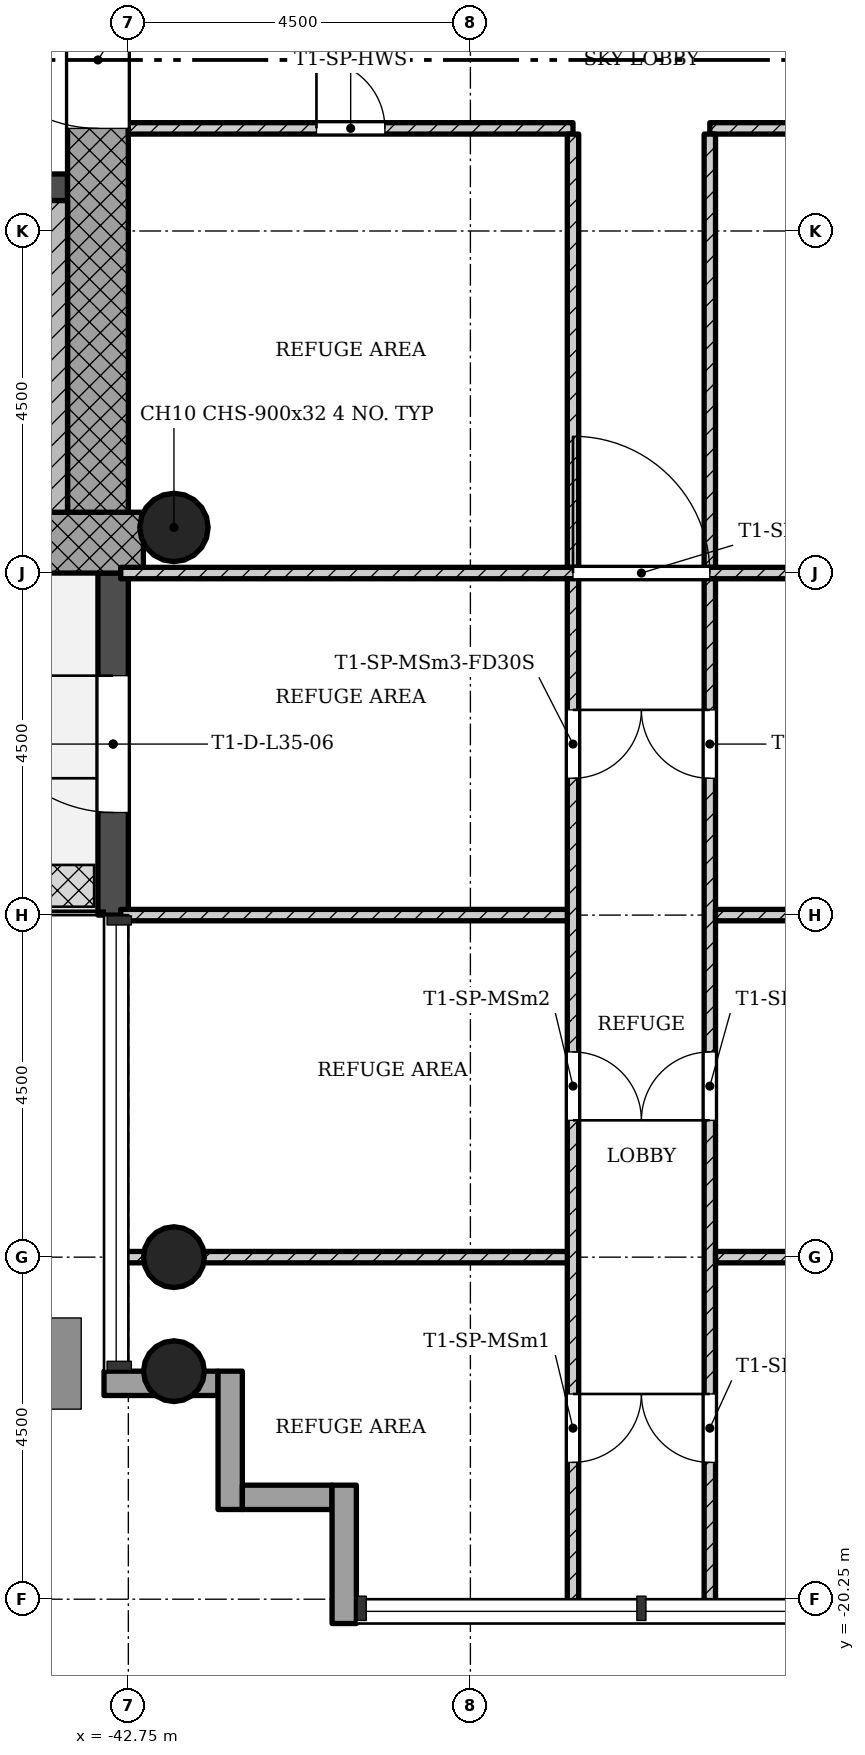
"""IFC4 building model, lengths in metres.
Left out: names, types, materials, properties, quantities, classifications, styles, units other than length and angle.
Written with IfcOpenShell. Run it as: python <this file> out.ifc"""

import sys

from ifc_helpers import new_model, si_unit, direction, frame, frame_2d, origin, origin_2d, place, context, subcontext, project, spatial, rectangle, hollow_circle, extrude, element, fill, save


model = new_model("IFC4")
c1 = context("Model", 3, precision=1e-05, world=origin(), true_north=direction((0.0, 1.0)))
c2 = subcontext(c1, "Body", "Model", "MODEL_VIEW")
j1 = project(units=[si_unit("LENGTHUNIT", "METRE"), si_unit("PLANEANGLEUNIT", "RADIAN")], contexts=[c1])
p1 = place(None, origin())
s1 = spatial("IfcSite", under=j1, at=p1, CompositionType="ELEMENT")
p2 = place(p1, origin())
s2 = spatial("IfcBuilding", under=s1, at=p2, CompositionType="ELEMENT")
p3 = place(p2, frame((0.0, 0.0, 128.7)))
s3 = spatial("IfcBuildingStorey", under=s2, at=p3, CompositionType="ELEMENT", Elevation=128.7)
p4 = place(p3, frame((-51.348, -6.35, 0.0), z_axis=(0.0, 0.0, 1.0), x_axis=(1.0, 0.0, 0.0)))
e1 = element("IfcWall", 1, at=p4, inside=s3, PredefinedType="SHEAR", context=c2, shape_type="SweptSolid", body=[
    extrude(rectangle(XDim=8.796, YDim=0.8, at=frame_2d((4.398, 0.0))), origin(), (0.0, 0.0, 1.0), 5.0),
])
p5 = place(p3, frame((-43.15, -5.95, 0.0), z_axis=(0.0, 0.0, 1.0), x_axis=(0.0, 1.0, 0.0)))
e2 = element("IfcWall", 2, at=p5, inside=s3, PredefinedType="SHEAR", context=c2, shape_type="SweptSolid", body=[
    extrude(rectangle(XDim=12.7, YDim=0.8, at=frame_2d((6.35, 0.0))), origin(), (0.0, 0.0, 1.0), 5.0),
])
p6 = place(p5, frame((5.05, 0.0, 0.0)))
e3 = element("IfcOpeningElement", 3, at=p6, cuts=e2, PredefinedType="OPENING", context=c2, shape_type="SweptSolid", body=[
    extrude(rectangle(XDim=1.8, YDim=2.1, at=frame_2d((0.9, 1.05))), frame((0.0, 0.41, 0.0), z_axis=(0.0, -1.0, 0.0), x_axis=(1.0, 0.0, 0.0)), (0.0, 0.0, 1.0), 0.82),
])
p7 = place(p3, frame((-50.95, -1.675, 0.0), z_axis=(0.0, 0.0, 1.0), x_axis=(1.0, 0.0, 0.0)))
e4 = element("IfcWall", 4, at=p7, inside=s3, PredefinedType="SHEAR", context=c2, shape_type="SweptSolid", body=[
    extrude(rectangle(XDim=7.4, YDim=0.35, at=frame_2d((3.7, 0.0))), origin(), (0.0, 0.0, 1.0), 5.0),
])
p8 = place(p7, frame((5.65, 0.0, 0.0)))
e5 = element("IfcOpeningElement", 5, at=p8, cuts=e4, PredefinedType="OPENING", context=c2, shape_type="SweptSolid", body=[
    extrude(rectangle(XDim=0.9, YDim=2.1, at=frame_2d((0.45, 1.05))), frame((0.0, 0.185, 0.0), z_axis=(0.0, -1.0, 0.0), x_axis=(1.0, 0.0, 0.0)), (0.0, 0.0, 1.0), 0.37),
])
for number, where, z_axis, x_axis in (
    (6, (-42.15, -15.75, 0.0), (0.0, 0.0, 1.0), (1.0, 0.0, 0.0)),
    (7, (-42.15, -17.25, 0.0), (0.0, 0.0, 1.0), (1.0, 0.0, 0.0)),
):
    element("IfcColumn", number, at=place(p3, frame(where, z_axis=z_axis, x_axis=x_axis)), inside=s3, PredefinedType="COLUMN", context=c2, shape_type="SweptSolid", body=[
        extrude(hollow_circle(Radius=0.4, WallThickness=0.028, at=origin_2d()), origin(), (0.0, 0.0, 1.0), 5.0),
    ])
p9 = place(p3, frame((-42.15, -6.15, 0.0), z_axis=(0.0, 0.0, 1.0), x_axis=(1.0, 0.0, 0.0)))
e8 = element("IfcColumn", 8, at=p9, inside=s3, PredefinedType="COLUMN", context=c2, shape_type="SweptSolid", body=[
    extrude(hollow_circle(Radius=0.45, WallThickness=0.032, at=origin_2d()), origin(), (0.0, 0.0, 1.0), 5.0),
])
p10 = place(p3, frame((-42.95, -6.75, -0.02), z_axis=(0.0, 0.0, 1.0), x_axis=(0.0, -1.0, 0.0)))
e9 = element("IfcWall", 9, at=p10, inside=s3, PredefinedType="STANDARD", context=c2, shape_type="SweptSolid", body=[
    extrude(rectangle(XDim=4.5, YDim=0.4, at=frame_2d((2.25, 0.0))), origin(), (0.0, 0.0, 1.0), 4.72),
])
p11 = place(p10, frame((1.35, 0.0, 0.02)))
e10 = element("IfcOpeningElement", 10, at=p11, cuts=e9, PredefinedType="OPENING", context=c2, shape_type="SweptSolid", body=[
    extrude(rectangle(XDim=1.8, YDim=2.1, at=frame_2d((0.9, 1.05))), frame((0.0, 0.21, 0.0), z_axis=(0.0, -1.0, 0.0), x_axis=(1.0, 0.0, 0.0)), (0.0, 0.0, 1.0), 0.42),
])
p12 = place(p3, frame((-43.07, -17.41, -0.3), z_axis=(0.0, 0.0, 1.0), x_axis=(1.0, 0.0, 0.0)))
e11 = element("IfcWall", 11, at=p12, inside=s3, PredefinedType="STANDARD", context=c2, shape_type="SweptSolid", body=[
    extrude(rectangle(XDim=1.5, YDim=0.32, at=frame_2d((0.75, 0.0))), origin(), (0.0, 0.0, 1.0), 5.0),
])
p13 = place(p3, frame((-41.41, -17.25, -0.3), z_axis=(0.0, 0.0, 1.0), x_axis=(0.0, -1.0, 0.0)))
e12 = element("IfcWall", 12, at=p13, inside=s3, PredefinedType="STANDARD", context=c2, shape_type="SweptSolid", body=[
    extrude(rectangle(XDim=1.82, YDim=0.32, at=frame_2d((0.91, 0.0))), origin(), (0.0, 0.0, 1.0), 5.0),
])
p14 = place(p3, frame((-41.25, -18.91, -0.3), z_axis=(0.0, 0.0, 1.0), x_axis=(1.0, 0.0, 0.0)))
e13 = element("IfcWall", 13, at=p14, inside=s3, PredefinedType="STANDARD", context=c2, shape_type="SweptSolid", body=[
    extrude(rectangle(XDim=1.18, YDim=0.32, at=frame_2d((0.59, 0.0))), origin(), (0.0, 0.0, 1.0), 5.0),
])
p15 = place(p3, frame((-39.91, -18.75, -0.3), z_axis=(0.0, 0.0, 1.0), x_axis=(0.0, -1.0, 0.0)))
e14 = element("IfcWall", 14, at=p15, inside=s3, PredefinedType="STANDARD", context=c2, shape_type="SweptSolid", body=[
    extrude(rectangle(XDim=1.82, YDim=0.32, at=frame_2d((0.91, 0.0))), origin(), (0.0, 0.0, 1.0), 5.0),
])
p16 = place(p3, frame((-35.1, -0.9, 0.0), z_axis=(0.0, 0.0, 1.0), x_axis=(1.0, 0.0, 0.0)))
e15 = element("IfcWall", 15, at=p16, inside=s3, PredefinedType="PARTITIONING", context=c2, shape_type="SweptSolid", body=[
    extrude(rectangle(XDim=5.85, YDim=0.15, at=frame_2d((2.925, 0.0))), origin(), (0.0, 0.0, 1.0), 4.58),
])
p17 = place(p16, frame((2.475, 0.0, 0.0)))
e16 = element("IfcOpeningElement", 16, at=p17, cuts=e15, PredefinedType="OPENING", context=c2, shape_type="SweptSolid", body=[
    extrude(rectangle(XDim=0.9, YDim=2.1, at=frame_2d((0.45, 1.05))), frame((0.0, 0.085, 0.0), z_axis=(0.0, -1.0, 0.0), x_axis=(1.0, 0.0, 0.0)), (0.0, 0.0, 1.0), 0.17),
])
p18 = place(p3, frame((-35.1, -6.675, 0.0), z_axis=(0.0, 0.0, 1.0), x_axis=(0.0, 1.0, 0.0)))
e17 = element("IfcWall", 17, at=p18, inside=s3, PredefinedType="PARTITIONING", context=c2, shape_type="SweptSolid", body=[
    extrude(rectangle(XDim=5.7, YDim=0.15, at=frame_2d((2.85, 0.0))), origin(), (0.0, 0.0, 1.0), 4.58),
])
p19 = place(p3, frame((-42.75, -0.9, 0.0), z_axis=(0.0, 0.0, 1.0), x_axis=(1.0, 0.0, 0.0)))
e18 = element("IfcWall", 18, at=p19, inside=s3, PredefinedType="PARTITIONING", context=c2, shape_type="SweptSolid", body=[
    extrude(rectangle(XDim=5.85, YDim=0.15, at=frame_2d((2.925, 0.0))), origin(), (0.0, 0.0, 1.0), 4.58),
])
p20 = place(p19, frame((2.475, 0.0, 0.0)))
e19 = element("IfcOpeningElement", 19, at=p20, cuts=e18, PredefinedType="OPENING", context=c2, shape_type="SweptSolid", body=[
    extrude(rectangle(XDim=0.9, YDim=2.1, at=frame_2d((0.45, 1.05))), frame((0.0, 0.085, 0.0), z_axis=(0.0, -1.0, 0.0), x_axis=(1.0, 0.0, 0.0)), (0.0, 0.0, 1.0), 0.17),
])
p21 = place(p3, frame((-36.9, -6.675, 0.0), z_axis=(0.0, 0.0, 1.0), x_axis=(0.0, 1.0, 0.0)))
e20 = element("IfcWall", 20, at=p21, inside=s3, PredefinedType="PARTITIONING", context=c2, shape_type="SweptSolid", body=[
    extrude(rectangle(XDim=5.7, YDim=0.15, at=frame_2d((2.85, 0.0))), origin(), (0.0, 0.0, 1.0), 4.58),
])
p22 = place(p3, frame((-42.85, -6.75, 0.0), z_axis=(0.0, 0.0, 1.0), x_axis=(1.0, 0.0, 0.0)))
e21 = element("IfcWall", 21, at=p22, inside=s3, PredefinedType="PARTITIONING", context=c2, shape_type="SweptSolid", body=[
    extrude(rectangle(XDim=13.7, YDim=0.15, at=frame_2d((6.85, 0.0))), origin(), (0.0, 0.0, 1.0), 4.58),
])
p23 = place(p22, frame((5.95, 0.0, 0.0)))
e22 = element("IfcOpeningElement", 22, at=p23, cuts=e21, PredefinedType="OPENING", context=c2, shape_type="SweptSolid", body=[
    extrude(rectangle(XDim=1.8, YDim=2.1, at=frame_2d((0.9, 1.05))), frame((0.0, 0.085, 0.0), z_axis=(0.0, -1.0, 0.0), x_axis=(1.0, 0.0, 0.0)), (0.0, 0.0, 1.0), 0.17),
])
p24 = place(p3, frame((-35.1, -20.35, 0.0), z_axis=(0.0, 0.0, 1.0), x_axis=(0.0, 1.0, 0.0)))
e23 = element("IfcWall", 23, at=p24, inside=s3, PredefinedType="PARTITIONING", context=c2, shape_type="SweptSolid", body=[
    extrude(rectangle(XDim=13.525, YDim=0.15, at=frame_2d((6.763, 0.0))), origin(), (0.0, 0.0, 1.0), 4.58),
])
p25 = place(p24, frame((1.9, 0.0, 0.0)))
e24 = element("IfcOpeningElement", 24, at=p25, cuts=e23, PredefinedType="OPENING", context=c2, shape_type="SweptSolid", body=[
    extrude(rectangle(XDim=0.9, YDim=2.1, at=frame_2d((0.45, 1.05))), frame((0.0, 0.085, 0.0), z_axis=(0.0, -1.0, 0.0), x_axis=(1.0, 0.0, 0.0)), (0.0, 0.0, 1.0), 0.17),
])
p26 = place(p24, frame((6.4, 0.0, 0.0)))
e25 = element("IfcOpeningElement", 25, at=p26, cuts=e23, PredefinedType="OPENING", context=c2, shape_type="SweptSolid", body=[
    extrude(rectangle(XDim=0.9, YDim=2.1, at=frame_2d((0.45, 1.05))), frame((0.0, 0.085, 0.0), z_axis=(0.0, -1.0, 0.0), x_axis=(1.0, 0.0, 0.0)), (0.0, 0.0, 1.0), 0.17),
])
p27 = place(p24, frame((10.9, 0.0, 0.0)))
e26 = element("IfcOpeningElement", 26, at=p27, cuts=e23, PredefinedType="OPENING", context=c2, shape_type="SweptSolid", body=[
    extrude(rectangle(XDim=0.9, YDim=2.1, at=frame_2d((0.45, 1.05))), frame((0.0, 0.085, 0.0), z_axis=(0.0, -1.0, 0.0), x_axis=(1.0, 0.0, 0.0)), (0.0, 0.0, 1.0), 0.17),
])
for number, where, z_axis, x_axis in (
    (27, (-35.025, -15.75, 0.0), (0.0, 0.0, 1.0), (1.0, 0.0, 0.0)),
    (28, (-35.025, -11.25, 0.0), (0.0, 0.0, 1.0), (1.0, 0.0, 0.0)),
):
    element("IfcWall", number, at=place(p3, frame(where, z_axis=z_axis, x_axis=x_axis)), inside=s3, PredefinedType="PARTITIONING", context=c2, shape_type="SweptSolid", body=[
        extrude(rectangle(XDim=5.875, YDim=0.15, at=frame_2d((2.938, 0.0))), origin(), (0.0, 0.0, 1.0), 4.58),
    ])
p28 = place(p3, frame((-36.9, -20.35, 0.0), z_axis=(0.0, 0.0, 1.0), x_axis=(0.0, 1.0, 0.0)))
e29 = element("IfcWall", 29, at=p28, inside=s3, PredefinedType="PARTITIONING", context=c2, shape_type="SweptSolid", body=[
    extrude(rectangle(XDim=13.525, YDim=0.15, at=frame_2d((6.763, 0.0))), origin(), (0.0, 0.0, 1.0), 4.58),
])
p29 = place(p28, frame((1.9, 0.0, 0.0)))
e30 = element("IfcOpeningElement", 30, at=p29, cuts=e29, PredefinedType="OPENING", context=c2, shape_type="SweptSolid", body=[
    extrude(rectangle(XDim=0.9, YDim=2.1, at=frame_2d((0.45, 1.05))), frame((0.0, 0.085, 0.0), z_axis=(0.0, -1.0, 0.0), x_axis=(1.0, 0.0, 0.0)), (0.0, 0.0, 1.0), 0.17),
])
p30 = place(p28, frame((6.4, 0.0, 0.0)))
e31 = element("IfcOpeningElement", 31, at=p30, cuts=e29, PredefinedType="OPENING", context=c2, shape_type="SweptSolid", body=[
    extrude(rectangle(XDim=0.9, YDim=2.1, at=frame_2d((0.45, 1.05))), frame((0.0, 0.085, 0.0), z_axis=(0.0, -1.0, 0.0), x_axis=(1.0, 0.0, 0.0)), (0.0, 0.0, 1.0), 0.17),
])
p31 = place(p28, frame((10.9, 0.0, 0.0)))
e32 = element("IfcOpeningElement", 32, at=p31, cuts=e29, PredefinedType="OPENING", context=c2, shape_type="SweptSolid", body=[
    extrude(rectangle(XDim=0.9, YDim=2.1, at=frame_2d((0.45, 1.05))), frame((0.0, 0.085, 0.0), z_axis=(0.0, -1.0, 0.0), x_axis=(1.0, 0.0, 0.0)), (0.0, 0.0, 1.0), 0.17),
])
for number, where, z_axis, x_axis in (
    (33, (-36.975, -15.75, 0.0), (0.0, 0.0, 1.0), (-1.0, 0.0, 0.0)),
    (34, (-36.975, -11.25, 0.0), (0.0, 0.0, 1.0), (-1.0, 0.0, 0.0)),
):
    element("IfcWall", number, at=place(p3, frame(where, z_axis=z_axis, x_axis=x_axis)), inside=s3, PredefinedType="PARTITIONING", context=c2, shape_type="SweptSolid", body=[
        extrude(rectangle(XDim=5.875, YDim=0.15, at=frame_2d((2.938, 0.0))), origin(), (0.0, 0.0, 1.0), 4.58),
    ])
p32 = place(p3, frame((-43.75, -1.85, 0.0), z_axis=(0.0, 0.0, 1.0), x_axis=(0.0, -1.0, 0.0)))
e35 = element("IfcWall", 35, at=p32, inside=s3, PredefinedType="SHEAR", context=c2, shape_type="SweptSolid", body=[
    extrude(rectangle(XDim=4.1, YDim=0.4, at=frame_2d((2.05, 0.0))), origin(), (0.0, 0.0, 1.0), 5.0),
])
p33 = place(p11, origin())
e36 = element("IfcDoor", 36, at=p33, inside=s3, OperationType="SINGLE_SWING_LEFT", PredefinedType="DOOR", context=c2, shape_type="SweptSolid", body=[
    extrude(rectangle(XDim=1.8, YDim=2.1, at=frame_2d((0.9, 1.05))), frame((0.0, 0.025, 0.0), z_axis=(0.0, -1.0, 0.0), x_axis=(1.0, 0.0, 0.0)), (0.0, 0.0, 1.0), 0.05),
])
fill(e10, e36)
p34 = place(p20, origin())
e37 = element("IfcDoor", 37, at=p34, inside=s3, OperationType="SINGLE_SWING_RIGHT", PredefinedType="DOOR", context=c2, shape_type="SweptSolid", body=[
    extrude(rectangle(XDim=0.9, YDim=2.1, at=frame_2d((0.45, 1.05))), frame((0.0, 0.025, 0.0), z_axis=(0.0, -1.0, 0.0), x_axis=(1.0, 0.0, 0.0)), (0.0, 0.0, 1.0), 0.05),
])
fill(e19, e37)
p35 = place(p23, origin())
e38 = element("IfcDoor", 38, at=p35, inside=s3, OperationType="SINGLE_SWING_RIGHT", PredefinedType="DOOR", context=c2, shape_type="SweptSolid", body=[
    extrude(rectangle(XDim=1.8, YDim=2.1, at=frame_2d((0.9, 1.05))), frame((0.0, 0.025, 0.0), z_axis=(0.0, -1.0, 0.0), x_axis=(1.0, 0.0, 0.0)), (0.0, 0.0, 1.0), 0.05),
])
fill(e22, e38)
p36 = place(p25, origin())
e39 = element("IfcDoor", 39, at=p36, inside=s3, OperationType="SINGLE_SWING_LEFT", PredefinedType="DOOR", context=c2, shape_type="SweptSolid", body=[
    extrude(rectangle(XDim=0.9, YDim=2.1, at=frame_2d((0.45, 1.05))), frame((0.0, 0.025, 0.0), z_axis=(0.0, -1.0, 0.0), x_axis=(1.0, 0.0, 0.0)), (0.0, 0.0, 1.0), 0.05),
])
fill(e24, e39)
p37 = place(p26, origin())
e40 = element("IfcDoor", 40, at=p37, inside=s3, OperationType="SINGLE_SWING_RIGHT", PredefinedType="DOOR", context=c2, shape_type="SweptSolid", body=[
    extrude(rectangle(XDim=0.9, YDim=2.1, at=frame_2d((0.45, 1.05))), frame((0.0, 0.025, 0.0), z_axis=(0.0, -1.0, 0.0), x_axis=(1.0, 0.0, 0.0)), (0.0, 0.0, 1.0), 0.05),
])
fill(e25, e40)
p38 = place(p27, origin())
e41 = element("IfcDoor", 41, at=p38, inside=s3, OperationType="SINGLE_SWING_LEFT", PredefinedType="DOOR", context=c2, shape_type="SweptSolid", body=[
    extrude(rectangle(XDim=0.9, YDim=2.1, at=frame_2d((0.45, 1.05))), frame((0.0, 0.025, 0.0), z_axis=(0.0, -1.0, 0.0), x_axis=(1.0, 0.0, 0.0)), (0.0, 0.0, 1.0), 0.05),
])
fill(e26, e41)
p39 = place(p29, origin())
e42 = element("IfcDoor", 42, at=p39, inside=s3, OperationType="SINGLE_SWING_RIGHT", PredefinedType="DOOR", context=c2, shape_type="SweptSolid", body=[
    extrude(rectangle(XDim=0.9, YDim=2.1, at=frame_2d((0.45, 1.05))), frame((0.0, 0.025, 0.0), z_axis=(0.0, -1.0, 0.0), x_axis=(1.0, 0.0, 0.0)), (0.0, 0.0, 1.0), 0.05),
])
fill(e30, e42)
p40 = place(p30, origin())
e43 = element("IfcDoor", 43, at=p40, inside=s3, OperationType="SINGLE_SWING_LEFT", PredefinedType="DOOR", context=c2, shape_type="SweptSolid", body=[
    extrude(rectangle(XDim=0.9, YDim=2.1, at=frame_2d((0.45, 1.05))), frame((0.0, 0.025, 0.0), z_axis=(0.0, -1.0, 0.0), x_axis=(1.0, 0.0, 0.0)), (0.0, 0.0, 1.0), 0.05),
])
fill(e31, e43)
p41 = place(p31, origin())
e44 = element("IfcDoor", 44, at=p41, inside=s3, OperationType="SINGLE_SWING_RIGHT", PredefinedType="DOOR", context=c2, shape_type="SweptSolid", body=[
    extrude(rectangle(XDim=0.9, YDim=2.1, at=frame_2d((0.45, 1.05))), frame((0.0, 0.025, 0.0), z_axis=(0.0, -1.0, 0.0), x_axis=(1.0, 0.0, 0.0)), (0.0, 0.0, 1.0), 0.05),
])
fill(e32, e44)
p42 = place(p6, origin())
e45 = element("IfcDoor", 45, at=p42, inside=s3, OperationType="SINGLE_SWING_LEFT", PredefinedType="DOOR", context=c2, shape_type="SweptSolid", body=[
    extrude(rectangle(XDim=1.8, YDim=2.1, at=frame_2d((0.9, 1.05))), frame((0.0, 0.025, 0.0), z_axis=(0.0, -1.0, 0.0), x_axis=(1.0, 0.0, 0.0)), (0.0, 0.0, 1.0), 0.05),
])
fill(e3, e45)
save(model, sys.argv[1])
